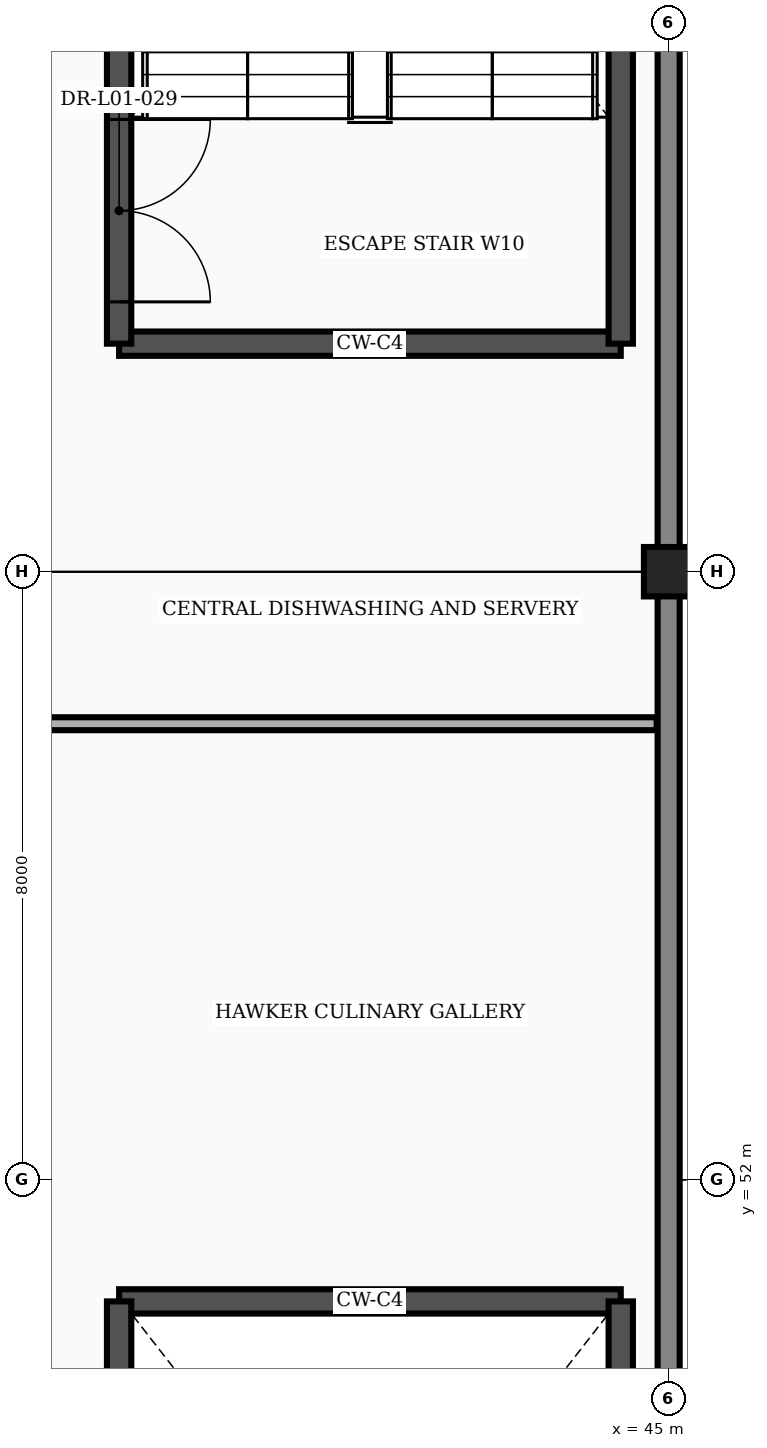
"""IFC4 building model, lengths in metres.
Left out: names, types, materials, properties, quantities, classifications, styles, units other than length and angle.
Written with IfcOpenShell. Run it as: python <this file> out.ifc"""

import sys

from ifc_helpers import new_model, si_unit, direction, frame, frame_2d, origin, origin_2d, place, context, subcontext, project, spatial, rectangle, extrude, element, fill, save


model = new_model("IFC4")
c1 = context("Model", 3, precision=1e-05, world=origin(), true_north=direction((0.0, 1.0)))
c2 = subcontext(c1, "Body", "Model", "MODEL_VIEW")
j1 = project(units=[si_unit("LENGTHUNIT", "METRE"), si_unit("PLANEANGLEUNIT", "RADIAN")], contexts=[c1])
p1 = place(None, origin())
s1 = spatial("IfcSite", under=j1, at=p1, CompositionType="ELEMENT")
p2 = place(p1, origin())
s2 = spatial("IfcBuilding", under=s1, at=p2, CompositionType="ELEMENT")
p3 = place(p2, frame((0.0, 0.0, 6.0)))
s3 = spatial("IfcBuildingStorey", under=s2, at=p3, CompositionType="ELEMENT", Elevation=6.0)
p4 = place(p3, frame((45.0, 60.0, 0.0), z_axis=(0.0, 0.0, 1.0), x_axis=(1.0, 0.0, 0.0)))
e1 = element("IfcColumn", 1, at=p4, inside=s3, PredefinedType="COLUMN", context=c2, shape_type="SweptSolid", body=[
    extrude(rectangle(XDim=0.65, YDim=0.65, at=origin_2d()), origin(), (0.0, 0.0, 1.0), 5.4),
])
for number, where, z_axis, x_axis in (
    (2, (45.0, 36.198, 0.0), (0.0, 0.0, 1.0), (0.0, 1.0, 0.0)),
    (3, (45.0, 60.317, 0.0), (0.0, 0.0, 1.0), (0.0, 1.0, 0.0)),
):
    element("IfcWall", number, at=place(p3, frame(where, z_axis=z_axis, x_axis=x_axis)), inside=s3, PredefinedType="STANDARD", context=c2, shape_type="SweptSolid", body=[
        extrude(rectangle(XDim=23.485, YDim=0.29, at=frame_2d((11.742, 0.0))), origin(), (0.0, 0.0, 1.0), 4.467),
    ])
p5 = place(p3, frame((37.77, 50.4, 0.0), z_axis=(0.0, 0.0, 1.0), x_axis=(1.0, 0.0, 0.0)))
e4 = element("IfcWall", 4, at=p5, inside=s3, PredefinedType="SHEAR", context=c2, shape_type="SweptSolid", body=[
    extrude(rectangle(XDim=6.6, YDim=0.32, at=frame_2d((3.3, 0.0))), origin(), (0.0, 0.0, 1.0), 5.15),
])
p6 = place(p3, frame((37.77, 39.2, 0.0), z_axis=(0.0, 0.0, 1.0), x_axis=(0.0, 1.0, 0.0)))
e5 = element("IfcWall", 5, at=p6, inside=s3, PredefinedType="SHEAR", context=c2, shape_type="SweptSolid", body=[
    extrude(rectangle(XDim=11.2, YDim=0.32, at=frame_2d((5.6, 0.0))), origin(), (0.0, 0.0, 1.0), 5.15),
])
p7 = place(p6, frame((0.55, 0.0, 0.0)))
e6 = element("IfcOpeningElement", 6, at=p7, cuts=e5, PredefinedType="OPENING", context=c2, shape_type="SweptSolid", body=[
    extrude(rectangle(XDim=2.4, YDim=2.25, at=frame_2d((1.2, 1.125))), frame((0.0, 0.172, 0.0), z_axis=(0.0, -1.0, 0.0), x_axis=(1.0, 0.0, 0.0)), (0.0, 0.0, 1.0), 0.344),
])
p8 = place(p3, frame((44.37, 39.2, 0.0), z_axis=(0.0, 0.0, 1.0), x_axis=(0.0, 1.0, 0.0)))
e7 = element("IfcWall", 7, at=p8, inside=s3, PredefinedType="SHEAR", context=c2, shape_type="SweptSolid", body=[
    extrude(rectangle(XDim=11.2, YDim=0.32, at=frame_2d((5.6, 0.0))), origin(), (0.0, 0.0, 1.0), 5.15),
])
p9 = place(p3, frame((37.77, 63.0, 0.0), z_axis=(0.0, 0.0, 1.0), x_axis=(1.0, 0.0, 0.0)))
e8 = element("IfcWall", 8, at=p9, inside=s3, PredefinedType="SHEAR", context=c2, shape_type="SweptSolid", body=[
    extrude(rectangle(XDim=6.6, YDim=0.32, at=frame_2d((3.3, 0.0))), origin(), (0.0, 0.0, 1.0), 5.15),
])
p10 = place(p3, frame((37.77, 63.0, 0.0), z_axis=(0.0, 0.0, 1.0), x_axis=(0.0, 1.0, 0.0)))
e9 = element("IfcWall", 9, at=p10, inside=s3, PredefinedType="SHEAR", context=c2, shape_type="SweptSolid", body=[
    extrude(rectangle(XDim=11.2, YDim=0.32, at=frame_2d((5.6, 0.0))), origin(), (0.0, 0.0, 1.0), 5.15),
])
p11 = place(p10, frame((0.55, 0.0, 0.0)))
e10 = element("IfcOpeningElement", 10, at=p11, cuts=e9, PredefinedType="OPENING", context=c2, shape_type="SweptSolid", body=[
    extrude(rectangle(XDim=2.4, YDim=2.25, at=frame_2d((1.2, 1.125))), frame((0.0, 0.172, 0.0), z_axis=(0.0, -1.0, 0.0), x_axis=(1.0, 0.0, 0.0)), (0.0, 0.0, 1.0), 0.344),
])
p12 = place(p3, frame((44.37, 63.0, 0.0), z_axis=(0.0, 0.0, 1.0), x_axis=(0.0, 1.0, 0.0)))
e11 = element("IfcWall", 11, at=p12, inside=s3, PredefinedType="SHEAR", context=c2, shape_type="SweptSolid", body=[
    extrude(rectangle(XDim=11.2, YDim=0.32, at=frame_2d((5.6, 0.0))), origin(), (0.0, 0.0, 1.0), 5.15),
])
p13 = place(p3, frame((26.56, 58.0, 0.0), z_axis=(0.0, 0.0, 1.0), x_axis=(1.0, 0.0, 0.0)))
e12 = element("IfcWall", 12, at=p13, inside=s3, PredefinedType="PARTITIONING", context=c2, shape_type="SweptSolid", body=[
    extrude(rectangle(XDim=18.282, YDim=0.17, at=frame_2d((9.141, 0.0))), origin(), (0.0, 0.0, 1.0), 5.15),
])
p14 = place(p11, frame((2.4, 0.0, 0.0), z_axis=(0.0, 0.0, 1.0), x_axis=(-1.0, 0.0, 0.0)))
e13 = element("IfcDoor", 13, at=p14, inside=s3, OperationType="DOUBLE_DOOR_SINGLE_SWING", PredefinedType="DOOR", context=c2, shape_type="SweptSolid", body=[
    extrude(rectangle(XDim=2.4, YDim=2.25, at=frame_2d((1.2, 1.125))), frame((0.0, 0.025, 0.0), z_axis=(0.0, -1.0, 0.0), x_axis=(1.0, 0.0, 0.0)), (0.0, 0.0, 1.0), 0.05),
])
fill(e10, e13)
save(model, sys.argv[1])
